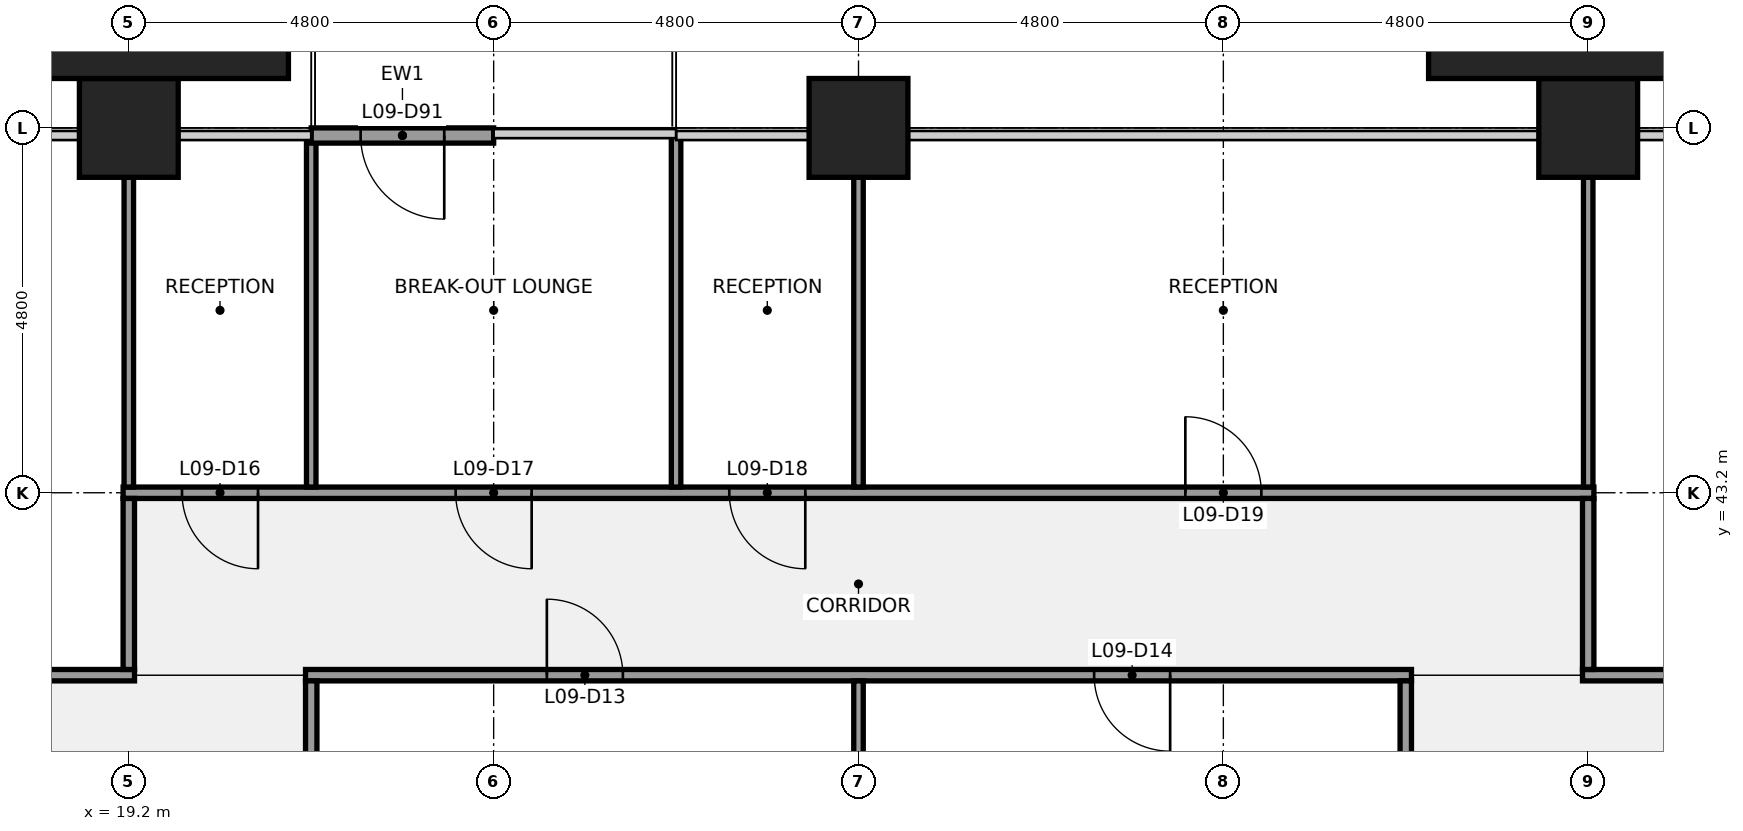
"""IFC4 building model, lengths in metres.
Left out: names, types, materials, properties, quantities, classifications, styles, units other than length and angle.
Written with IfcOpenShell. Run it as: python <this file> out.ifc"""

import sys

from ifc_helpers import new_model, si_unit, direction, frame, frame_2d, origin, origin_2d, place, context, subcontext, project, spatial, rectangle, extrude, element, fill, save


model = new_model("IFC4")
c1 = context("Model", 3, precision=1e-05, world=origin(), true_north=direction((0.0, 1.0)))
c2 = subcontext(c1, "Body", "Model", "MODEL_VIEW")
j1 = project(units=[si_unit("LENGTHUNIT", "METRE"), si_unit("PLANEANGLEUNIT", "RADIAN")], contexts=[c1])
p1 = place(None, origin())
s1 = spatial("IfcSite", under=j1, at=p1, CompositionType="ELEMENT")
p2 = place(p1, origin())
s2 = spatial("IfcBuilding", under=s1, at=p2, CompositionType="ELEMENT")
p3 = place(p2, frame((0.0, 0.0, 47.0)))
s3 = spatial("IfcBuildingStorey", under=s2, at=p3, CompositionType="ELEMENT", Elevation=47.0)
for number, where, z_axis, x_axis in (
    (1, (19.2, 48.0, 0.0), (0.0, 0.0, 1.0), (1.0, 0.0, 0.0)),
    (2, (28.8, 48.0, 0.0), (0.0, 0.0, 1.0), (1.0, 0.0, 0.0)),
    (3, (38.4, 48.0, 0.0), (0.0, 0.0, 1.0), (1.0, 0.0, 0.0)),
):
    element("IfcColumn", number, at=place(p3, frame(where, z_axis=z_axis, x_axis=x_axis)), inside=s3, PredefinedType="COLUMN", context=c2, shape_type="SweptSolid", body=[
        extrude(rectangle(XDim=1.3, YDim=1.3, at=origin_2d()), origin(), (0.0, 0.0, 1.0), 4.0),
    ])
p4 = place(p3, frame((9.525, 40.8, 0.0), z_axis=(0.0, 0.0, 1.0), x_axis=(1.0, 0.0, 0.0)))
e4 = element("IfcWall", 4, at=p4, inside=s3, PredefinedType="PARTITIONING", context=c2, shape_type="SweptSolid", body=[
    extrude(rectangle(XDim=9.75, YDim=0.15, at=frame_2d((4.875, 0.0))), origin(), (0.0, 0.0, 1.0), 2.87),
])
p5 = place(p4, frame((4.375, 0.0, 0.0)))
e5 = element("IfcOpeningElement", 5, at=p5, cuts=e4, PredefinedType="OPENING", context=c2, shape_type="SweptSolid", body=[
    extrude(rectangle(XDim=1.0, YDim=2.1, at=frame_2d((0.5, 1.05))), frame((0.0, 0.085, 0.0), z_axis=(0.0, -1.0, 0.0), x_axis=(1.0, 0.0, 0.0)), (0.0, 0.0, 1.0), 0.17),
])
p6 = place(p3, frame((21.525, 40.8, 0.0), z_axis=(0.0, 0.0, 1.0), x_axis=(1.0, 0.0, 0.0)))
e6 = element("IfcWall", 6, at=p6, inside=s3, PredefinedType="PARTITIONING", context=c2, shape_type="SweptSolid", body=[
    extrude(rectangle(XDim=14.55, YDim=0.15, at=frame_2d((7.275, 0.0))), origin(), (0.0, 0.0, 1.0), 2.87),
])
p7 = place(p6, frame((3.175, 0.0, 0.0)))
e7 = element("IfcOpeningElement", 7, at=p7, cuts=e6, PredefinedType="OPENING", context=c2, shape_type="SweptSolid", body=[
    extrude(rectangle(XDim=1.0, YDim=2.1, at=frame_2d((0.5, 1.05))), frame((0.0, 0.085, 0.0), z_axis=(0.0, -1.0, 0.0), x_axis=(1.0, 0.0, 0.0)), (0.0, 0.0, 1.0), 0.17),
])
p8 = place(p6, frame((10.375, 0.0, 0.0)))
e8 = element("IfcOpeningElement", 8, at=p8, cuts=e6, PredefinedType="OPENING", context=c2, shape_type="SweptSolid", body=[
    extrude(rectangle(XDim=1.0, YDim=2.1, at=frame_2d((0.5, 1.05))), frame((0.0, 0.085, 0.0), z_axis=(0.0, -1.0, 0.0), x_axis=(1.0, 0.0, 0.0)), (0.0, 0.0, 1.0), 0.17),
])
p9 = place(p3, frame((38.325, 40.8, 0.0), z_axis=(0.0, 0.0, 1.0), x_axis=(1.0, 0.0, 0.0)))
e9 = element("IfcWall", 9, at=p9, inside=s3, PredefinedType="PARTITIONING", context=c2, shape_type="SweptSolid", body=[
    extrude(rectangle(XDim=9.75, YDim=0.15, at=frame_2d((4.875, 0.0))), origin(), (0.0, 0.0, 1.0), 2.87),
])
p10 = place(p9, frame((4.375, 0.0, 0.0)))
e10 = element("IfcOpeningElement", 10, at=p10, cuts=e9, PredefinedType="OPENING", context=c2, shape_type="SweptSolid", body=[
    extrude(rectangle(XDim=1.0, YDim=2.1, at=frame_2d((0.5, 1.05))), frame((0.0, 0.085, 0.0), z_axis=(0.0, -1.0, 0.0), x_axis=(1.0, 0.0, 0.0)), (0.0, 0.0, 1.0), 0.17),
])
p11 = place(p3, frame((19.125, 43.2, 0.0), z_axis=(0.0, 0.0, 1.0), x_axis=(1.0, 0.0, 0.0)))
e11 = element("IfcWall", 11, at=p11, inside=s3, PredefinedType="PARTITIONING", context=c2, shape_type="SweptSolid", body=[
    extrude(rectangle(XDim=19.35, YDim=0.15, at=frame_2d((9.675, 0.0))), origin(), (0.0, 0.0, 1.0), 2.87),
])
p12 = place(p11, frame((0.775, 0.0, 0.0)))
e12 = element("IfcOpeningElement", 12, at=p12, cuts=e11, PredefinedType="OPENING", context=c2, shape_type="SweptSolid", body=[
    extrude(rectangle(XDim=1.0, YDim=2.1, at=frame_2d((0.5, 1.05))), frame((0.0, 0.085, 0.0), z_axis=(0.0, -1.0, 0.0), x_axis=(1.0, 0.0, 0.0)), (0.0, 0.0, 1.0), 0.17),
])
p13 = place(p11, frame((4.375, 0.0, 0.0)))
e13 = element("IfcOpeningElement", 13, at=p13, cuts=e11, PredefinedType="OPENING", context=c2, shape_type="SweptSolid", body=[
    extrude(rectangle(XDim=1.0, YDim=2.1, at=frame_2d((0.5, 1.05))), frame((0.0, 0.085, 0.0), z_axis=(0.0, -1.0, 0.0), x_axis=(1.0, 0.0, 0.0)), (0.0, 0.0, 1.0), 0.17),
])
p14 = place(p11, frame((7.975, 0.0, 0.0)))
e14 = element("IfcOpeningElement", 14, at=p14, cuts=e11, PredefinedType="OPENING", context=c2, shape_type="SweptSolid", body=[
    extrude(rectangle(XDim=1.0, YDim=2.1, at=frame_2d((0.5, 1.05))), frame((0.0, 0.085, 0.0), z_axis=(0.0, -1.0, 0.0), x_axis=(1.0, 0.0, 0.0)), (0.0, 0.0, 1.0), 0.17),
])
p15 = place(p11, frame((13.975, 0.0, 0.0)))
e15 = element("IfcOpeningElement", 15, at=p15, cuts=e11, PredefinedType="OPENING", context=c2, shape_type="SweptSolid", body=[
    extrude(rectangle(XDim=1.0, YDim=2.1, at=frame_2d((0.5, 1.05))), frame((0.0, 0.085, 0.0), z_axis=(0.0, -1.0, 0.0), x_axis=(1.0, 0.0, 0.0)), (0.0, 0.0, 1.0), 0.17),
])
p16 = place(p3, frame((19.2, 43.275, 0.0), z_axis=(0.0, 0.0, 1.0), x_axis=(0.0, 1.0, 0.0)))
e16 = element("IfcWall", 16, at=p16, inside=s3, PredefinedType="PARTITIONING", context=c2, shape_type="SweptSolid", body=[
    extrude(rectangle(XDim=4.075, YDim=0.125, at=frame_2d((2.038, 0.0))), origin(), (0.0, 0.0, 1.0), 2.87),
])
p17 = place(p3, frame((19.2, 40.875, 0.0), z_axis=(0.0, 0.0, 1.0), x_axis=(0.0, 1.0, 0.0)))
e17 = element("IfcWall", 17, at=p17, inside=s3, PredefinedType="PARTITIONING", context=c2, shape_type="SweptSolid", body=[
    extrude(rectangle(XDim=2.25, YDim=0.15, at=frame_2d((1.125, 0.0))), origin(), (0.0, 0.0, 1.0), 2.87),
])
p18 = place(p3, frame((21.6, 43.275, 0.0), z_axis=(0.0, 0.0, 1.0), x_axis=(0.0, 1.0, 0.0)))
e18 = element("IfcWall", 18, at=p18, inside=s3, PredefinedType="PARTITIONING", context=c2, shape_type="SweptSolid", body=[
    extrude(rectangle(XDim=4.625, YDim=0.125, at=frame_2d((2.312, 0.0))), origin(), (0.0, 0.0, 1.0), 2.87),
])
p19 = place(p3, frame((21.6, 33.663, 0.0), z_axis=(0.0, 0.0, 1.0), x_axis=(0.0, 1.0, 0.0)))
e19 = element("IfcWall", 19, at=p19, inside=s3, PredefinedType="PARTITIONING", context=c2, shape_type="SweptSolid", body=[
    extrude(rectangle(XDim=7.062, YDim=0.15, at=frame_2d((3.531, 0.0))), origin(), (0.0, 0.0, 1.0), 2.87),
])
p20 = place(p3, frame((26.4, 43.275, 0.0), z_axis=(0.0, 0.0, 1.0), x_axis=(0.0, 1.0, 0.0)))
e20 = element("IfcWall", 20, at=p20, inside=s3, PredefinedType="PARTITIONING", context=c2, shape_type="SweptSolid", body=[
    extrude(rectangle(XDim=4.625, YDim=0.125, at=frame_2d((2.312, 0.0))), origin(), (0.0, 0.0, 1.0), 2.87),
])
p21 = place(p3, frame((28.8, 33.663, 0.0), z_axis=(0.0, 0.0, 1.0), x_axis=(0.0, 1.0, 0.0)))
e21 = element("IfcWall", 21, at=p21, inside=s3, PredefinedType="PARTITIONING", context=c2, shape_type="SweptSolid", body=[
    extrude(rectangle(XDim=7.062, YDim=0.125, at=frame_2d((3.531, 0.0))), origin(), (0.0, 0.0, 1.0), 2.87),
])
p22 = place(p3, frame((28.8, 43.275, 0.0), z_axis=(0.0, 0.0, 1.0), x_axis=(0.0, 1.0, 0.0)))
e22 = element("IfcWall", 22, at=p22, inside=s3, PredefinedType="PARTITIONING", context=c2, shape_type="SweptSolid", body=[
    extrude(rectangle(XDim=4.075, YDim=0.125, at=frame_2d((2.038, 0.0))), origin(), (0.0, 0.0, 1.0), 2.87),
])
p23 = place(p3, frame((36.0, 33.663, 0.0), z_axis=(0.0, 0.0, 1.0), x_axis=(0.0, 1.0, 0.0)))
e23 = element("IfcWall", 23, at=p23, inside=s3, PredefinedType="PARTITIONING", context=c2, shape_type="SweptSolid", body=[
    extrude(rectangle(XDim=7.062, YDim=0.15, at=frame_2d((3.531, 0.0))), origin(), (0.0, 0.0, 1.0), 2.87),
])
p24 = place(p3, frame((38.4, 43.275, 0.0), z_axis=(0.0, 0.0, 1.0), x_axis=(0.0, 1.0, 0.0)))
e24 = element("IfcWall", 24, at=p24, inside=s3, PredefinedType="PARTITIONING", context=c2, shape_type="SweptSolid", body=[
    extrude(rectangle(XDim=4.075, YDim=0.125, at=frame_2d((2.038, 0.0))), origin(), (0.0, 0.0, 1.0), 2.87),
])
p25 = place(p3, frame((38.4, 40.875, 0.0), z_axis=(0.0, 0.0, 1.0), x_axis=(0.0, 1.0, 0.0)))
e25 = element("IfcWall", 25, at=p25, inside=s3, PredefinedType="PARTITIONING", context=c2, shape_type="SweptSolid", body=[
    extrude(rectangle(XDim=2.25, YDim=0.15, at=frame_2d((1.125, 0.0))), origin(), (0.0, 0.0, 1.0), 2.87),
])
p26 = place(p3, frame((24.0, 47.9, 0.0), z_axis=(0.0, 0.0, 1.0), x_axis=(-1.0, 0.0, 0.0)))
e26 = element("IfcWall", 26, at=p26, inside=s3, PredefinedType="SOLIDWALL", context=c2, shape_type="SweptSolid", body=[
    extrude(rectangle(XDim=2.4, YDim=0.2, at=frame_2d((1.2, 0.0))), origin(), (0.0, 0.0, 1.0), 3.314),
])
p27 = place(p26, frame((0.65, 0.0, 0.0)))
e27 = element("IfcOpeningElement", 27, at=p27, cuts=e26, PredefinedType="OPENING", context=c2, shape_type="SweptSolid", body=[
    extrude(rectangle(XDim=1.1, YDim=2.1, at=frame_2d((0.55, 1.05))), frame((0.0, 0.11, 0.0), z_axis=(0.0, -1.0, 0.0), x_axis=(1.0, 0.0, 0.0)), (0.0, 0.0, 1.0), 0.22),
])
for number, where, z_axis, x_axis in (
    (28, (19.2, 49.075, 0.0), (0.0, 0.0, 1.0), (1.0, 0.0, 0.0)),
    (29, (38.4, 49.075, 0.0), (0.0, 0.0, 1.0), (1.0, 0.0, 0.0)),
):
    element("IfcColumn", number, at=place(p3, frame(where, z_axis=z_axis, x_axis=x_axis)), inside=s3, PredefinedType="PILASTER", context=c2, shape_type="SweptSolid", body=[
        extrude(rectangle(XDim=4.2, YDim=0.85, at=origin_2d()), origin(), (0.0, 0.0, 1.0), 4.0),
    ])
p28 = place(p7, origin())
e30 = element("IfcDoor", 30, at=p28, inside=s3, OperationType="SINGLE_SWING_LEFT", PredefinedType="DOOR", context=c2, shape_type="SweptSolid", body=[
    extrude(rectangle(XDim=1.0, YDim=2.1, at=frame_2d((0.5, 1.05))), frame((0.0, 0.025, 0.0), z_axis=(0.0, -1.0, 0.0), x_axis=(1.0, 0.0, 0.0)), (0.0, 0.0, 1.0), 0.05),
])
fill(e7, e30)
p29 = place(p8, origin())
e31 = element("IfcDoor", 31, at=p29, inside=s3, OperationType="SINGLE_SWING_RIGHT", PredefinedType="DOOR", context=c2, shape_type="SweptSolid", body=[
    extrude(rectangle(XDim=1.0, YDim=2.1, at=frame_2d((0.5, 1.05))), frame((0.0, 0.025, 0.0), z_axis=(0.0, -1.0, 0.0), x_axis=(1.0, 0.0, 0.0)), (0.0, 0.0, 1.0), 0.05),
])
fill(e8, e31)
p30 = place(p12, origin())
e32 = element("IfcDoor", 32, at=p30, inside=s3, OperationType="SINGLE_SWING_RIGHT", PredefinedType="DOOR", context=c2, shape_type="SweptSolid", body=[
    extrude(rectangle(XDim=1.0, YDim=2.1, at=frame_2d((0.5, 1.05))), frame((0.0, 0.025, 0.0), z_axis=(0.0, -1.0, 0.0), x_axis=(1.0, 0.0, 0.0)), (0.0, 0.0, 1.0), 0.05),
])
fill(e12, e32)
p31 = place(p13, origin())
e33 = element("IfcDoor", 33, at=p31, inside=s3, OperationType="SINGLE_SWING_RIGHT", PredefinedType="DOOR", context=c2, shape_type="SweptSolid", body=[
    extrude(rectangle(XDim=1.0, YDim=2.1, at=frame_2d((0.5, 1.05))), frame((0.0, 0.025, 0.0), z_axis=(0.0, -1.0, 0.0), x_axis=(1.0, 0.0, 0.0)), (0.0, 0.0, 1.0), 0.05),
])
fill(e13, e33)
p32 = place(p14, origin())
e34 = element("IfcDoor", 34, at=p32, inside=s3, OperationType="SINGLE_SWING_RIGHT", PredefinedType="DOOR", context=c2, shape_type="SweptSolid", body=[
    extrude(rectangle(XDim=1.0, YDim=2.1, at=frame_2d((0.5, 1.05))), frame((0.0, 0.025, 0.0), z_axis=(0.0, -1.0, 0.0), x_axis=(1.0, 0.0, 0.0)), (0.0, 0.0, 1.0), 0.05),
])
fill(e14, e34)
p33 = place(p15, origin())
e35 = element("IfcDoor", 35, at=p33, inside=s3, OperationType="SINGLE_SWING_LEFT", PredefinedType="DOOR", context=c2, shape_type="SweptSolid", body=[
    extrude(rectangle(XDim=1.0, YDim=2.1, at=frame_2d((0.5, 1.05))), frame((0.0, 0.025, 0.0), z_axis=(0.0, -1.0, 0.0), x_axis=(1.0, 0.0, 0.0)), (0.0, 0.0, 1.0), 0.05),
])
fill(e15, e35)
p34 = place(p27, origin())
e36 = element("IfcDoor", 36, at=p34, inside=s3, OperationType="SINGLE_SWING_LEFT", PredefinedType="DOOR", context=c2, shape_type="SweptSolid", body=[
    extrude(rectangle(XDim=1.1, YDim=2.1, at=frame_2d((0.55, 1.05))), frame((0.0, 0.025, 0.0), z_axis=(0.0, -1.0, 0.0), x_axis=(1.0, 0.0, 0.0)), (0.0, 0.0, 1.0), 0.05),
])
fill(e27, e36)
save(model, sys.argv[1])
